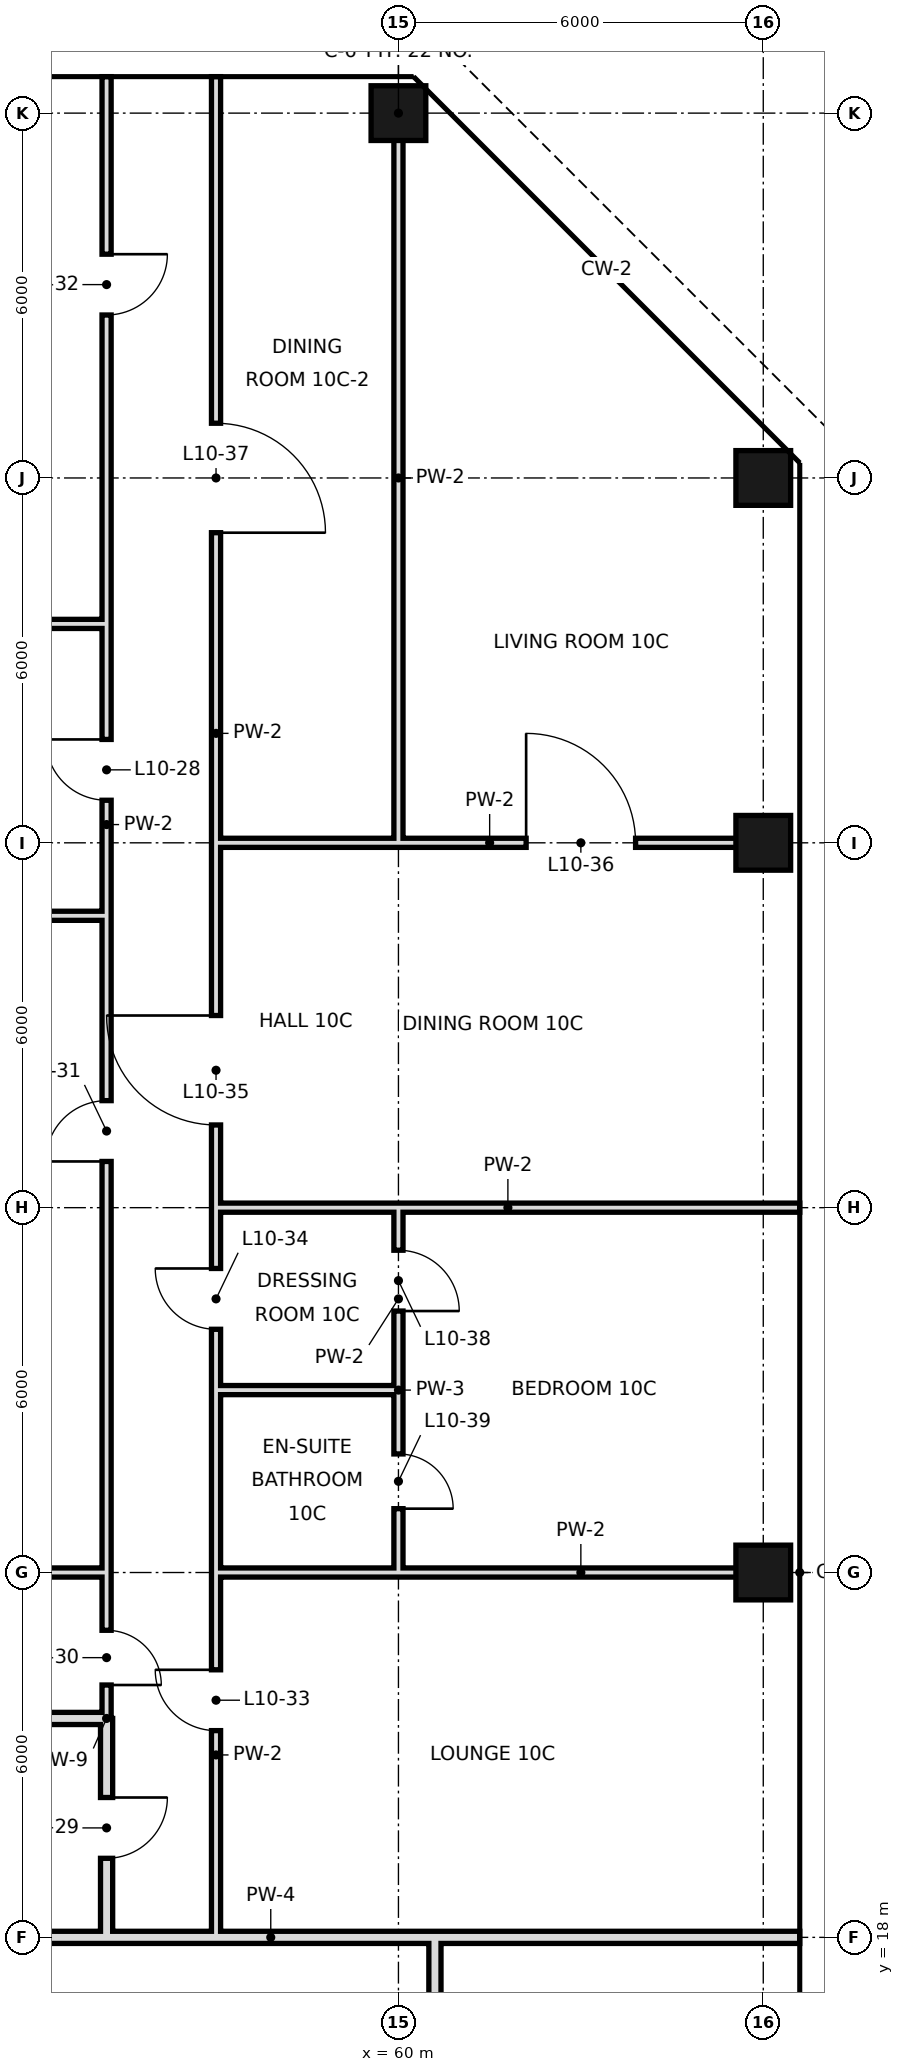
"""IFC4 building model, lengths in metres.
Left out: names, types, materials, properties, quantities, classifications, styles, units other than length and angle.
Written with IfcOpenShell. Run it as: python <this file> out.ifc"""

import sys

from ifc_helpers import new_model, si_unit, direction, frame, frame_2d, origin, origin_2d, place, context, subcontext, project, spatial, rectangle, hollow_rectangle, extrude, element, fill, save


model = new_model("IFC4")
c1 = context("Model", 3, precision=1e-05, world=origin(), true_north=direction((0.0, 1.0)))
c2 = subcontext(c1, "Body", "Model", "MODEL_VIEW")
j1 = project(units=[si_unit("LENGTHUNIT", "METRE"), si_unit("PLANEANGLEUNIT", "RADIAN")], contexts=[c1])
p1 = place(None, origin())
s1 = spatial("IfcSite", under=j1, at=p1, CompositionType="ELEMENT")
p2 = place(p1, origin())
s2 = spatial("IfcBuilding", under=s1, at=p2, CompositionType="ELEMENT")
p3 = place(p2, frame((0.0, 0.0, 57.0)))
s3 = spatial("IfcBuildingStorey", under=s2, at=p3, CompositionType="ELEMENT", Elevation=57.0)
for number, where, z_axis, x_axis in (
    (1, (60.0, 48.0, 0.0), (0.0, 0.0, 1.0), (1.0, 0.0, 0.0)),
    (2, (66.0, 24.0, 0.0), (0.0, 0.0, 1.0), (1.0, 0.0, 0.0)),
    (3, (66.0, 36.0, 0.0), (0.0, 0.0, 1.0), (1.0, 0.0, 0.0)),
    (4, (66.0, 42.0, 0.0), (0.0, 0.0, 1.0), (1.0, 0.0, 0.0)),
):
    element("IfcColumn", number, at=place(p3, frame(where, z_axis=z_axis, x_axis=x_axis)), inside=s3, PredefinedType="COLUMN", context=c2, shape_type="SweptSolid", body=[
        extrude(hollow_rectangle(XDim=0.9, YDim=0.9, WallThickness=0.045, at=origin_2d()), origin(), (0.0, 0.0, 1.0), 3.6),
    ])
p4 = place(p3, frame((55.2, 18.0, 0.0), z_axis=(0.0, 0.0, 1.0), x_axis=(0.0, 1.0, 0.0)))
e5 = element("IfcWall", 5, at=p4, inside=s3, PredefinedType="SOLIDWALL", context=c2, shape_type="SweptSolid", body=[
    extrude(rectangle(XDim=3.6, YDim=0.2, at=frame_2d((1.8, 0.0))), origin(), (0.0, 0.0, 1.0), 2.52),
])
p5 = place(p4, frame((1.3, 0.0, 0.0)))
e6 = element("IfcOpeningElement", 6, at=p5, cuts=e5, PredefinedType="OPENING", context=c2, shape_type="SweptSolid", body=[
    extrude(rectangle(XDim=1.0, YDim=2.4, at=frame_2d((0.5, 1.2))), frame((0.0, 0.11, 0.0), z_axis=(0.0, -1.0, 0.0), x_axis=(1.0, 0.0, 0.0)), (0.0, 0.0, 1.0), 0.22),
])
p6 = place(p3, frame((55.2, 24.0, 0.0), z_axis=(0.0, 0.0, 1.0), x_axis=(0.0, 1.0, 0.0)))
e7 = element("IfcWall", 7, at=p6, inside=s3, PredefinedType="PARTITIONING", context=c2, shape_type="SweptSolid", body=[
    extrude(rectangle(XDim=24.6, YDim=0.15, at=frame_2d((12.3, 0.0))), origin(), (0.0, 0.0, 1.0), 3.42),
])
p7 = place(p6, frame((12.7, 0.0, 0.0)))
e8 = element("IfcOpeningElement", 8, at=p7, cuts=e7, PredefinedType="OPENING", context=c2, shape_type="SweptSolid", body=[
    extrude(rectangle(XDim=1.0, YDim=2.4, at=frame_2d((0.5, 1.2))), frame((0.0, 0.085, 0.0), z_axis=(0.0, -1.0, 0.0), x_axis=(1.0, 0.0, 0.0)), (0.0, 0.0, 1.0), 0.17),
])
p8 = place(p6, frame((6.76, 0.0, 0.0)))
e9 = element("IfcOpeningElement", 9, at=p8, cuts=e7, PredefinedType="OPENING", context=c2, shape_type="SweptSolid", body=[
    extrude(rectangle(XDim=1.0, YDim=2.4, at=frame_2d((0.5, 1.2))), frame((0.0, 0.085, 0.0), z_axis=(0.0, -1.0, 0.0), x_axis=(1.0, 0.0, 0.0)), (0.0, 0.0, 1.0), 0.17),
])
p9 = place(p6, frame((20.68, 0.0, 0.0)))
e10 = element("IfcOpeningElement", 10, at=p9, cuts=e7, PredefinedType="OPENING", context=c2, shape_type="SweptSolid", body=[
    extrude(rectangle(XDim=1.0, YDim=2.4, at=frame_2d((0.5, 1.2))), frame((0.0, 0.085, 0.0), z_axis=(0.0, -1.0, 0.0), x_axis=(1.0, 0.0, 0.0)), (0.0, 0.0, 1.0), 0.17),
])
p10 = place(p3, frame((55.2, 21.6, 0.0), z_axis=(0.0, 0.0, 1.0), x_axis=(0.0, 1.0, 0.0)))
e11 = element("IfcWall", 11, at=p10, inside=s3, PredefinedType="PARTITIONING", context=c2, shape_type="SweptSolid", body=[
    extrude(rectangle(XDim=2.4, YDim=0.15, at=frame_2d((1.2, 0.0))), origin(), (0.0, 0.0, 1.0), 3.42),
])
p11 = place(p10, frame((0.55, 0.0, 0.0)))
e12 = element("IfcOpeningElement", 12, at=p11, cuts=e11, PredefinedType="OPENING", context=c2, shape_type="SweptSolid", body=[
    extrude(rectangle(XDim=0.9, YDim=2.4, at=frame_2d((0.45, 1.2))), frame((0.0, 0.085, 0.0), z_axis=(0.0, -1.0, 0.0), x_axis=(1.0, 0.0, 0.0)), (0.0, 0.0, 1.0), 0.17),
])
p12 = place(p3, frame((57.0, 18.0, 0.0), z_axis=(0.0, 0.0, 1.0), x_axis=(0.0, 1.0, 0.0)))
e13 = element("IfcWall", 13, at=p12, inside=s3, PredefinedType="PARTITIONING", context=c2, shape_type="SweptSolid", body=[
    extrude(rectangle(XDim=6.0, YDim=0.15, at=frame_2d((3.0, 0.0))), origin(), (0.0, 0.0, 1.0), 3.42),
])
p13 = place(p12, frame((3.4, 0.0, 0.0)))
e14 = element("IfcOpeningElement", 14, at=p13, cuts=e13, PredefinedType="OPENING", context=c2, shape_type="SweptSolid", body=[
    extrude(rectangle(XDim=1.0, YDim=2.4, at=frame_2d((0.5, 1.2))), frame((0.0, 0.085, 0.0), z_axis=(0.0, -1.0, 0.0), x_axis=(1.0, 0.0, 0.0)), (0.0, 0.0, 1.0), 0.17),
])
p14 = place(p3, frame((57.0, 27.0, 0.0), z_axis=(0.0, 0.0, 1.0), x_axis=(0.0, 1.0, 0.0)))
e15 = element("IfcWall", 15, at=p14, inside=s3, PredefinedType="PARTITIONING", context=c2, shape_type="SweptSolid", body=[
    extrude(rectangle(XDim=21.6, YDim=0.15, at=frame_2d((10.8, 0.0))), origin(), (0.0, 0.0, 1.0), 3.42),
])
p15 = place(p14, frame((1.0, 0.0, 0.0)))
e16 = element("IfcOpeningElement", 16, at=p15, cuts=e15, PredefinedType="OPENING", context=c2, shape_type="SweptSolid", body=[
    extrude(rectangle(XDim=1.0, YDim=2.4, at=frame_2d((0.5, 1.2))), frame((0.0, 0.085, 0.0), z_axis=(0.0, -1.0, 0.0), x_axis=(1.0, 0.0, 0.0)), (0.0, 0.0, 1.0), 0.17),
])
p16 = place(p14, frame((4.36, 0.0, 0.0)))
e17 = element("IfcOpeningElement", 17, at=p16, cuts=e15, PredefinedType="OPENING", context=c2, shape_type="SweptSolid", body=[
    extrude(rectangle(XDim=1.8, YDim=2.4, at=frame_2d((0.9, 1.2))), frame((0.0, 0.085, 0.0), z_axis=(0.0, -1.0, 0.0), x_axis=(1.0, 0.0, 0.0)), (0.0, 0.0, 1.0), 0.17),
])
p17 = place(p14, frame((14.1, 0.0, 0.0)))
e18 = element("IfcOpeningElement", 18, at=p17, cuts=e15, PredefinedType="OPENING", context=c2, shape_type="SweptSolid", body=[
    extrude(rectangle(XDim=1.8, YDim=2.4, at=frame_2d((0.9, 1.2))), frame((0.0, 0.085, 0.0), z_axis=(0.0, -1.0, 0.0), x_axis=(1.0, 0.0, 0.0)), (0.0, 0.0, 1.0), 0.17),
])
p18 = place(p3, frame((57.0, 24.0, 0.0), z_axis=(0.0, 0.0, 1.0), x_axis=(0.0, 1.0, 0.0)))
e19 = element("IfcWall", 19, at=p18, inside=s3, PredefinedType="PARTITIONING", context=c2, shape_type="SweptSolid", body=[
    extrude(rectangle(XDim=3.0, YDim=0.15, at=frame_2d((1.5, 0.0))), origin(), (0.0, 0.0, 1.0), 3.42),
])
p19 = place(p3, frame((60.0, 27.0, 0.0), z_axis=(0.0, 0.0, 1.0), x_axis=(0.0, 1.0, 0.0)))
e20 = element("IfcWall", 20, at=p19, inside=s3, PredefinedType="PARTITIONING", context=c2, shape_type="SweptSolid", body=[
    extrude(rectangle(XDim=3.0, YDim=0.15, at=frame_2d((1.5, 0.0))), origin(), (0.0, 0.0, 1.0), 3.42),
])
p20 = place(p19, frame((1.3, 0.0, 0.0)))
e21 = element("IfcOpeningElement", 21, at=p20, cuts=e20, PredefinedType="OPENING", context=c2, shape_type="SweptSolid", body=[
    extrude(rectangle(XDim=1.0, YDim=2.4, at=frame_2d((0.5, 1.2))), frame((0.0, 0.085, 0.0), z_axis=(0.0, -1.0, 0.0), x_axis=(1.0, 0.0, 0.0)), (0.0, 0.0, 1.0), 0.17),
])
p21 = place(p3, frame((60.0, 36.0, 0.0), z_axis=(0.0, 0.0, 1.0), x_axis=(0.0, 1.0, 0.0)))
e22 = element("IfcWall", 22, at=p21, inside=s3, PredefinedType="PARTITIONING", context=c2, shape_type="SweptSolid", body=[
    extrude(rectangle(XDim=12.0, YDim=0.15, at=frame_2d((6.0, 0.0))), origin(), (0.0, 0.0, 1.0), 3.42),
])
p22 = place(p3, frame((60.0, 24.0, 0.0), z_axis=(0.0, 0.0, 1.0), x_axis=(0.0, 1.0, 0.0)))
e23 = element("IfcWall", 23, at=p22, inside=s3, PredefinedType="PARTITIONING", context=c2, shape_type="SweptSolid", body=[
    extrude(rectangle(XDim=3.0, YDim=0.15, at=frame_2d((1.5, 0.0))), origin(), (0.0, 0.0, 1.0), 3.42),
])
p23 = place(p22, frame((1.05, 0.0, 0.0)))
e24 = element("IfcOpeningElement", 24, at=p23, cuts=e23, PredefinedType="OPENING", context=c2, shape_type="SweptSolid", body=[
    extrude(rectangle(XDim=0.9, YDim=2.4, at=frame_2d((0.45, 1.2))), frame((0.0, 0.085, 0.0), z_axis=(0.0, -1.0, 0.0), x_axis=(1.0, 0.0, 0.0)), (0.0, 0.0, 1.0), 0.17),
])
p24 = place(p3, frame((60.6, 10.8, 0.0), z_axis=(0.0, 0.0, 1.0), x_axis=(0.0, 1.0, 0.0)))
e25 = element("IfcWall", 25, at=p24, inside=s3, PredefinedType="SOLIDWALL", context=c2, shape_type="SweptSolid", body=[
    extrude(rectangle(XDim=7.2, YDim=0.2, at=frame_2d((3.6, 0.0))), origin(), (0.0, 0.0, 1.0), 2.52),
])
p25 = place(p3, frame((44.9, 18.0, 0.0), z_axis=(0.0, 0.0, 1.0), x_axis=(1.0, 0.0, 0.0)))
e26 = element("IfcWall", 26, at=p25, inside=s3, PredefinedType="SOLIDWALL", context=c2, shape_type="SweptSolid", body=[
    extrude(rectangle(XDim=10.3, YDim=0.2, at=frame_2d((5.15, 0.0))), origin(), (0.0, 0.0, 1.0), 2.52),
])
p26 = place(p3, frame((60.6, 18.0, 0.0), z_axis=(0.0, 0.0, 1.0), x_axis=(1.0, 0.0, 0.0)))
e27 = element("IfcWall", 27, at=p26, inside=s3, PredefinedType="SOLIDWALL", context=c2, shape_type="SweptSolid", body=[
    extrude(rectangle(XDim=6.0, YDim=0.2, at=frame_2d((3.0, 0.0))), origin(), (0.0, 0.0, 1.0), 2.52),
])
p27 = place(p3, frame((55.2, 18.0, 0.0), z_axis=(0.0, 0.0, 1.0), x_axis=(1.0, 0.0, 0.0)))
e28 = element("IfcWall", 28, at=p27, inside=s3, PredefinedType="SOLIDWALL", context=c2, shape_type="SweptSolid", body=[
    extrude(rectangle(XDim=5.4, YDim=0.2, at=frame_2d((2.7, 0.0))), origin(), (0.0, 0.0, 1.0), 2.52),
])
p28 = place(p3, frame((44.9, 21.6, 0.0), z_axis=(0.0, 0.0, 1.0), x_axis=(1.0, 0.0, 0.0)))
e29 = element("IfcWall", 29, at=p28, inside=s3, PredefinedType="SOLIDWALL", context=c2, shape_type="SweptSolid", body=[
    extrude(rectangle(XDim=10.3, YDim=0.2, at=frame_2d((5.15, 0.0))), origin(), (0.0, 0.0, 1.0), 2.72),
])
p29 = place(p3, frame((60.0, 24.0, 0.0), z_axis=(0.0, 0.0, 1.0), x_axis=(1.0, 0.0, 0.0)))
e30 = element("IfcWall", 30, at=p29, inside=s3, PredefinedType="PARTITIONING", context=c2, shape_type="SweptSolid", body=[
    extrude(rectangle(XDim=6.0, YDim=0.15, at=frame_2d((3.0, 0.0))), origin(), (0.0, 0.0, 1.0), 2.52),
])
p30 = place(p3, frame((44.9, 24.0, 0.0), z_axis=(0.0, 0.0, 1.0), x_axis=(1.0, 0.0, 0.0)))
e31 = element("IfcWall", 31, at=p30, inside=s3, PredefinedType="PARTITIONING", context=c2, shape_type="SweptSolid", body=[
    extrude(rectangle(XDim=10.3, YDim=0.15, at=frame_2d((5.15, 0.0))), origin(), (0.0, 0.0, 1.0), 2.52),
])
p31 = place(p3, frame((57.0, 24.0, 0.0), z_axis=(0.0, 0.0, 1.0), x_axis=(1.0, 0.0, 0.0)))
e32 = element("IfcWall", 32, at=p31, inside=s3, PredefinedType="PARTITIONING", context=c2, shape_type="SweptSolid", body=[
    extrude(rectangle(XDim=3.0, YDim=0.15, at=frame_2d((1.5, 0.0))), origin(), (0.0, 0.0, 1.0), 2.52),
])
p32 = place(p3, frame((57.0, 27.0, 0.0), z_axis=(0.0, 0.0, 1.0), x_axis=(1.0, 0.0, 0.0)))
e33 = element("IfcWall", 33, at=p32, inside=s3, PredefinedType="PARTITIONING", context=c2, shape_type="SweptSolid", body=[
    extrude(rectangle(XDim=3.0, YDim=0.15, at=frame_2d((1.5, 0.0))), origin(), (0.0, 0.0, 1.0), 3.42),
])
p33 = place(p3, frame((57.0, 30.0, 0.0), z_axis=(0.0, 0.0, 1.0), x_axis=(1.0, 0.0, 0.0)))
e34 = element("IfcWall", 34, at=p33, inside=s3, PredefinedType="PARTITIONING", context=c2, shape_type="SweptSolid", body=[
    extrude(rectangle(XDim=9.6, YDim=0.15, at=frame_2d((4.8, 0.0))), origin(), (0.0, 0.0, 1.0), 2.52),
])
p34 = place(p3, frame((44.9, 34.8, 0.0), z_axis=(0.0, 0.0, 1.0), x_axis=(1.0, 0.0, 0.0)))
e35 = element("IfcWall", 35, at=p34, inside=s3, PredefinedType="PARTITIONING", context=c2, shape_type="SweptSolid", body=[
    extrude(rectangle(XDim=10.3, YDim=0.15, at=frame_2d((5.15, 0.0))), origin(), (0.0, 0.0, 1.0), 3.42),
])
p35 = place(p3, frame((57.0, 36.0, 0.0), z_axis=(0.0, 0.0, 1.0), x_axis=(1.0, 0.0, 0.0)))
e36 = element("IfcWall", 36, at=p35, inside=s3, PredefinedType="PARTITIONING", context=c2, shape_type="SweptSolid", body=[
    extrude(rectangle(XDim=9.0, YDim=0.15, at=frame_2d((4.5, 0.0))), origin(), (0.0, 0.0, 1.0), 2.52),
])
p36 = place(p35, frame((5.1, 0.0, 0.0)))
e37 = element("IfcOpeningElement", 37, at=p36, cuts=e36, PredefinedType="OPENING", context=c2, shape_type="SweptSolid", body=[
    extrude(rectangle(XDim=1.8, YDim=2.4, at=frame_2d((0.9, 1.2))), frame((0.0, 0.085, 0.0), z_axis=(0.0, -1.0, 0.0), x_axis=(1.0, 0.0, 0.0)), (0.0, 0.0, 1.0), 0.17),
])
p37 = place(p3, frame((44.9, 39.6, 0.0), z_axis=(0.0, 0.0, 1.0), x_axis=(1.0, 0.0, 0.0)))
e38 = element("IfcWall", 38, at=p37, inside=s3, PredefinedType="PARTITIONING", context=c2, shape_type="SweptSolid", body=[
    extrude(rectangle(XDim=10.3, YDim=0.15, at=frame_2d((5.15, 0.0))), origin(), (0.0, 0.0, 1.0), 3.42),
])
p38 = place(p7, frame((1.0, 0.0, 0.0), z_axis=(0.0, 0.0, 1.0), x_axis=(-1.0, 0.0, 0.0)))
e39 = element("IfcDoor", 39, at=p38, inside=s3, OperationType="SINGLE_SWING_LEFT", PredefinedType="DOOR", context=c2, shape_type="SweptSolid", body=[
    extrude(rectangle(XDim=1.0, YDim=2.4, at=frame_2d((0.5, 1.2))), frame((0.0, 0.025, 0.0), z_axis=(0.0, -1.0, 0.0), x_axis=(1.0, 0.0, 0.0)), (0.0, 0.0, 1.0), 0.05),
])
fill(e8, e39)
p39 = place(p5, origin())
e40 = element("IfcDoor", 40, at=p39, inside=s3, OperationType="SINGLE_SWING_RIGHT", PredefinedType="DOOR", context=c2, shape_type="SweptSolid", body=[
    extrude(rectangle(XDim=1.0, YDim=2.4, at=frame_2d((0.5, 1.2))), frame((0.0, 0.025, 0.0), z_axis=(0.0, -1.0, 0.0), x_axis=(1.0, 0.0, 0.0)), (0.0, 0.0, 1.0), 0.05),
])
fill(e6, e40)
p40 = place(p11, frame((0.9, 0.0, 0.0), z_axis=(0.0, 0.0, 1.0), x_axis=(-1.0, 0.0, 0.0)))
e41 = element("IfcDoor", 41, at=p40, inside=s3, OperationType="SINGLE_SWING_RIGHT", PredefinedType="DOOR", context=c2, shape_type="SweptSolid", body=[
    extrude(rectangle(XDim=0.9, YDim=2.4, at=frame_2d((0.45, 1.2))), frame((0.0, 0.025, 0.0), z_axis=(0.0, -1.0, 0.0), x_axis=(1.0, 0.0, 0.0)), (0.0, 0.0, 1.0), 0.05),
])
fill(e12, e41)
p41 = place(p8, origin())
e42 = element("IfcDoor", 42, at=p41, inside=s3, OperationType="SINGLE_SWING_LEFT", PredefinedType="DOOR", context=c2, shape_type="SweptSolid", body=[
    extrude(rectangle(XDim=1.0, YDim=2.4, at=frame_2d((0.5, 1.2))), frame((0.0, 0.025, 0.0), z_axis=(0.0, -1.0, 0.0), x_axis=(1.0, 0.0, 0.0)), (0.0, 0.0, 1.0), 0.05),
])
fill(e9, e42)
p42 = place(p9, origin())
e43 = element("IfcDoor", 43, at=p42, inside=s3, OperationType="SINGLE_SWING_RIGHT", PredefinedType="DOOR", context=c2, shape_type="SweptSolid", body=[
    extrude(rectangle(XDim=1.0, YDim=2.4, at=frame_2d((0.5, 1.2))), frame((0.0, 0.025, 0.0), z_axis=(0.0, -1.0, 0.0), x_axis=(1.0, 0.0, 0.0)), (0.0, 0.0, 1.0), 0.05),
])
fill(e10, e43)
p43 = place(p13, frame((1.0, 0.0, 0.0), z_axis=(0.0, 0.0, 1.0), x_axis=(-1.0, 0.0, 0.0)))
e44 = element("IfcDoor", 44, at=p43, inside=s3, OperationType="SINGLE_SWING_LEFT", PredefinedType="DOOR", context=c2, shape_type="SweptSolid", body=[
    extrude(rectangle(XDim=1.0, YDim=2.4, at=frame_2d((0.5, 1.2))), frame((0.0, 0.025, 0.0), z_axis=(0.0, -1.0, 0.0), x_axis=(1.0, 0.0, 0.0)), (0.0, 0.0, 1.0), 0.05),
])
fill(e14, e44)
p44 = place(p15, frame((1.0, 0.0, 0.0), z_axis=(0.0, 0.0, 1.0), x_axis=(-1.0, 0.0, 0.0)))
e45 = element("IfcDoor", 45, at=p44, inside=s3, OperationType="SINGLE_SWING_LEFT", PredefinedType="DOOR", context=c2, shape_type="SweptSolid", body=[
    extrude(rectangle(XDim=1.0, YDim=2.4, at=frame_2d((0.5, 1.2))), frame((0.0, 0.025, 0.0), z_axis=(0.0, -1.0, 0.0), x_axis=(1.0, 0.0, 0.0)), (0.0, 0.0, 1.0), 0.05),
])
fill(e16, e45)
p45 = place(p16, frame((1.8, 0.0, 0.0), z_axis=(0.0, 0.0, 1.0), x_axis=(-1.0, 0.0, 0.0)))
e46 = element("IfcDoor", 46, at=p45, inside=s3, OperationType="SINGLE_SWING_LEFT", PredefinedType="DOOR", context=c2, shape_type="SweptSolid", body=[
    extrude(rectangle(XDim=1.8, YDim=2.4, at=frame_2d((0.9, 1.2))), frame((0.0, 0.025, 0.0), z_axis=(0.0, -1.0, 0.0), x_axis=(1.0, 0.0, 0.0)), (0.0, 0.0, 1.0), 0.05),
])
fill(e17, e46)
p46 = place(p36, origin())
e47 = element("IfcDoor", 47, at=p46, inside=s3, OperationType="SINGLE_SWING_LEFT", PredefinedType="DOOR", context=c2, shape_type="SweptSolid", body=[
    extrude(rectangle(XDim=1.8, YDim=2.4, at=frame_2d((0.9, 1.2))), frame((0.0, 0.025, 0.0), z_axis=(0.0, -1.0, 0.0), x_axis=(1.0, 0.0, 0.0)), (0.0, 0.0, 1.0), 0.05),
])
fill(e37, e47)
p47 = place(p17, frame((1.8, 0.0, 0.0), z_axis=(0.0, 0.0, 1.0), x_axis=(-1.0, 0.0, 0.0)))
e48 = element("IfcDoor", 48, at=p47, inside=s3, OperationType="SINGLE_SWING_RIGHT", PredefinedType="DOOR", context=c2, shape_type="SweptSolid", body=[
    extrude(rectangle(XDim=1.8, YDim=2.4, at=frame_2d((0.9, 1.2))), frame((0.0, 0.025, 0.0), z_axis=(0.0, -1.0, 0.0), x_axis=(1.0, 0.0, 0.0)), (0.0, 0.0, 1.0), 0.05),
])
fill(e18, e48)
p48 = place(p20, frame((1.0, 0.0, 0.0), z_axis=(0.0, 0.0, 1.0), x_axis=(-1.0, 0.0, 0.0)))
e49 = element("IfcDoor", 49, at=p48, inside=s3, OperationType="SINGLE_SWING_RIGHT", PredefinedType="DOOR", context=c2, shape_type="SweptSolid", body=[
    extrude(rectangle(XDim=1.0, YDim=2.4, at=frame_2d((0.5, 1.2))), frame((0.0, 0.025, 0.0), z_axis=(0.0, -1.0, 0.0), x_axis=(1.0, 0.0, 0.0)), (0.0, 0.0, 1.0), 0.05),
])
fill(e21, e49)
p49 = place(p23, frame((0.9, 0.0, 0.0), z_axis=(0.0, 0.0, 1.0), x_axis=(-1.0, 0.0, 0.0)))
e50 = element("IfcDoor", 50, at=p49, inside=s3, OperationType="SINGLE_SWING_RIGHT", PredefinedType="DOOR", context=c2, shape_type="SweptSolid", body=[
    extrude(rectangle(XDim=0.9, YDim=2.4, at=frame_2d((0.45, 1.2))), frame((0.0, 0.025, 0.0), z_axis=(0.0, -1.0, 0.0), x_axis=(1.0, 0.0, 0.0)), (0.0, 0.0, 1.0), 0.05),
])
fill(e24, e50)
save(model, sys.argv[1])
